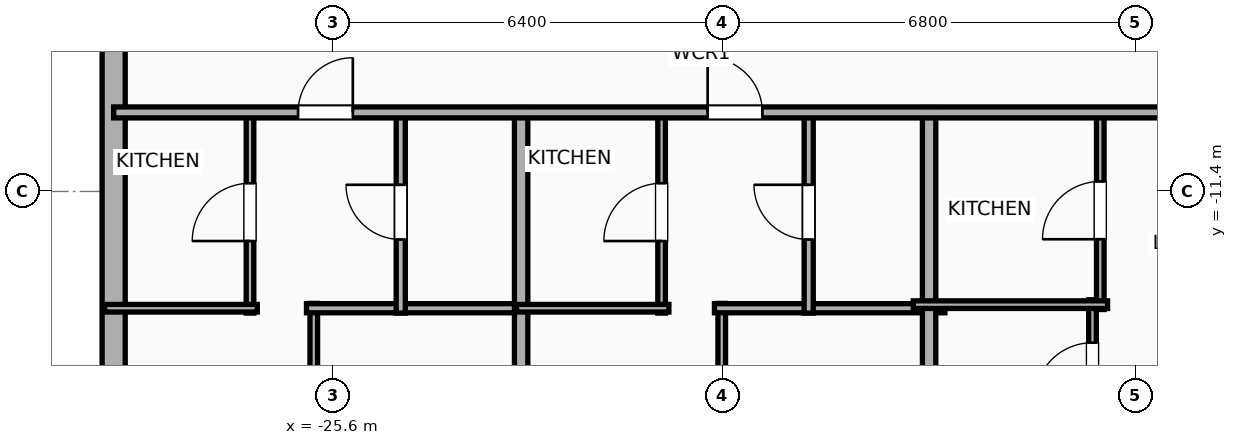
"""IFC4 building model, lengths in metres.
Left out: names, types, materials, properties, quantities, classifications, styles, units other than length and angle.
Written with IfcOpenShell. Run it as: python <this file> out.ifc"""

import sys

from ifc_helpers import new_model, si_unit, direction, frame, frame_2d, origin, place, context, subcontext, project, spatial, rectangle, extrude, element, fill, save


model = new_model("IFC4")
c1 = context("Model", 3, precision=1e-05, world=origin(), true_north=direction((0.0, 1.0)))
c2 = subcontext(c1, "Body", "Model", "MODEL_VIEW")
j1 = project(units=[si_unit("LENGTHUNIT", "METRE"), si_unit("PLANEANGLEUNIT", "RADIAN")], contexts=[c1])
p1 = place(None, origin())
s1 = spatial("IfcSite", under=j1, at=p1, CompositionType="ELEMENT")
p2 = place(p1, origin())
s2 = spatial("IfcBuilding", under=s1, at=p2, CompositionType="ELEMENT")
p3 = place(p2, frame((0.0, 0.0, 101.4)))
s3 = spatial("IfcBuildingStorey", under=s2, at=p3, CompositionType="ELEMENT", Elevation=101.4)
p4 = place(p3, frame((-29.21, -16.581, 0.0), z_axis=(0.0, 0.0, 1.0), x_axis=(0.0, 1.0, 0.0)))
e1 = element("IfcWall", 1, at=p4, inside=s3, PredefinedType="ELEMENTEDWALL", context=c2, shape_type="SweptSolid", body=[
    extrude(rectangle(XDim=34.363, YDim=0.38, at=frame_2d((17.181, 0.0))), origin(), (0.0, 0.0, 1.0), 3.65),
])
p5 = place(p4, frame((31.087, 0.0, 0.75)))
e2 = element("IfcOpeningElement", 2, at=p5, cuts=e1, PredefinedType="OPENING", context=c2, shape_type="SweptSolid", body=[
    extrude(rectangle(XDim=1.2, YDim=2.05, at=frame_2d((0.6, 1.025))), frame((0.0, 0.2, 0.0), z_axis=(0.0, -1.0, 0.0), x_axis=(1.0, 0.0, 0.0)), (0.0, 0.0, 1.0), 0.4),
])
p6 = place(p4, frame((21.626, 0.0, 0.75)))
e3 = element("IfcOpeningElement", 3, at=p6, cuts=e1, PredefinedType="OPENING", context=c2, shape_type="SweptSolid", body=[
    extrude(rectangle(XDim=1.2, YDim=2.05, at=frame_2d((0.6, 1.025))), frame((0.0, 0.2, 0.0), z_axis=(0.0, -1.0, 0.0), x_axis=(1.0, 0.0, 0.0)), (0.0, 0.0, 1.0), 0.4),
])
p7 = place(p4, frame((10.551, 0.0, 0.75)))
e4 = element("IfcOpeningElement", 4, at=p7, cuts=e1, PredefinedType="OPENING", context=c2, shape_type="SweptSolid", body=[
    extrude(rectangle(XDim=1.2, YDim=2.05, at=frame_2d((0.6, 1.025))), frame((0.0, 0.2, 0.0), z_axis=(0.0, -1.0, 0.0), x_axis=(1.0, 0.0, 0.0)), (0.0, 0.0, 1.0), 0.4),
])
p8 = place(p3, frame((-25.919, -20.456, 0.0), z_axis=(0.0, 0.0, 1.0), x_axis=(0.0, 1.0, 0.0)))
e5 = element("IfcWall", 5, at=p8, inside=s3, PredefinedType="PARTITIONING", context=c2, shape_type="SweptSolid", body=[
    extrude(rectangle(XDim=7.216, YDim=0.125, at=frame_2d((3.608, 0.0))), origin(), (0.0, 0.0, 1.0), 3.65),
])
p9 = place(p8, frame((5.034, 0.0, 0.0)))
e6 = element("IfcOpeningElement", 6, at=p9, cuts=e5, PredefinedType="OPENING", context=c2, shape_type="SweptSolid", body=[
    extrude(rectangle(XDim=0.9, YDim=2.05, at=frame_2d((0.45, 1.025))), frame((0.0, 0.073, 0.0), z_axis=(0.0, -1.0, 0.0), x_axis=(1.0, 0.0, 0.0)), (0.0, 0.0, 1.0), 0.145),
])
p10 = place(p3, frame((-26.039, -13.32, 0.0), z_axis=(0.0, 0.0, 1.0), x_axis=(1.0, 0.0, 0.0)))
e7 = element("IfcWall", 7, at=p10, inside=s3, PredefinedType="PLUMBINGWALL", context=c2, shape_type="SweptSolid", body=[
    extrude(rectangle(XDim=3.605, YDim=0.15, at=frame_2d((1.802, 0.0))), origin(), (0.0, 0.0, 1.0), 3.65),
])
p11 = place(p3, frame((-26.968, -13.4, 0.0), z_axis=(0.0, 0.0, 1.0), x_axis=(0.0, 1.0, 0.0)))
e8 = element("IfcWall", 8, at=p11, inside=s3, PredefinedType="PARTITIONING", context=c2, shape_type="SweptSolid", body=[
    extrude(rectangle(XDim=3.32, YDim=0.125, at=frame_2d((1.66, 0.0))), origin(), (0.0, 0.0, 1.0), 3.65),
])
p12 = place(p11, frame((1.185, 0.0, 0.0)))
e9 = element("IfcOpeningElement", 9, at=p12, cuts=e8, PredefinedType="OPENING", context=c2, shape_type="SweptSolid", body=[
    extrude(rectangle(XDim=0.95, YDim=2.05, at=frame_2d((0.475, 1.025))), frame((0.0, 0.073, 0.0), z_axis=(0.0, -1.0, 0.0), x_axis=(1.0, 0.0, 0.0)), (0.0, 0.0, 1.0), 0.145),
])
p13 = place(p3, frame((-29.36, -13.32, 0.0), z_axis=(0.0, 0.0, 1.0), x_axis=(1.0, 0.0, 0.0)))
e10 = element("IfcWall", 10, at=p13, inside=s3, PredefinedType="PARTITIONING", context=c2, shape_type="SweptSolid", body=[
    extrude(rectangle(XDim=2.512, YDim=0.125, at=frame_2d((1.256, 0.0))), origin(), (0.0, 0.0, 1.0), 3.65),
])
p14 = place(p3, frame((-24.489, -13.4, 0.0), z_axis=(0.0, 0.0, 1.0), x_axis=(0.0, 1.0, 0.0)))
e11 = element("IfcWall", 11, at=p14, inside=s3, PredefinedType="PLUMBINGWALL", context=c2, shape_type="SweptSolid", body=[
    extrude(rectangle(XDim=3.32, YDim=0.15, at=frame_2d((1.66, 0.0))), origin(), (0.0, 0.0, 1.0), 3.65),
])
p15 = place(p14, frame((1.21, 0.0, 0.0)))
e12 = element("IfcOpeningElement", 12, at=p15, cuts=e11, PredefinedType="OPENING", context=c2, shape_type="SweptSolid", body=[
    extrude(rectangle(XDim=0.9, YDim=2.05, at=frame_2d((0.45, 1.025))), frame((0.0, 0.085, 0.0), z_axis=(0.0, -1.0, 0.0), x_axis=(1.0, 0.0, 0.0)), (0.0, 0.0, 1.0), 0.17),
])
p16 = place(p3, frame((-22.509, -20.41, 0.0), z_axis=(0.0, 0.0, 1.0), x_axis=(0.0, 1.0, 0.0)))
e13 = element("IfcWall", 13, at=p16, inside=s3, PredefinedType="PARTITIONING", context=c2, shape_type="SweptSolid", body=[
    extrude(rectangle(XDim=10.39, YDim=0.22, at=frame_2d((5.195, 0.0))), origin(), (0.0, 0.0, 1.0), 3.65),
])
p17 = place(p3, frame((-19.21, -20.56, 0.0), z_axis=(0.0, 0.0, 1.0), x_axis=(0.0, 1.0, 0.0)))
e14 = element("IfcWall", 14, at=p17, inside=s3, PredefinedType="PARTITIONING", context=c2, shape_type="SweptSolid", body=[
    extrude(rectangle(XDim=7.32, YDim=0.125, at=frame_2d((3.66, 0.0))), origin(), (0.0, 0.0, 1.0), 3.65),
])
p18 = place(p17, frame((5.113, 0.0, 0.0)))
e15 = element("IfcOpeningElement", 15, at=p18, cuts=e14, PredefinedType="OPENING", context=c2, shape_type="SweptSolid", body=[
    extrude(rectangle(XDim=0.9, YDim=2.05, at=frame_2d((0.45, 1.025))), frame((0.0, 0.073, 0.0), z_axis=(0.0, -1.0, 0.0), x_axis=(1.0, 0.0, 0.0)), (0.0, 0.0, 1.0), 0.145),
])
p19 = place(p3, frame((-19.33, -13.32, 0.0), z_axis=(0.0, 0.0, 1.0), x_axis=(1.0, 0.0, 0.0)))
e16 = element("IfcWall", 16, at=p19, inside=s3, PredefinedType="PLUMBINGWALL", context=c2, shape_type="SweptSolid", body=[
    extrude(rectangle(XDim=3.79, YDim=0.15, at=frame_2d((1.895, 0.0))), origin(), (0.0, 0.0, 1.0), 3.65),
])
p20 = place(p3, frame((-20.199, -13.4, 0.0), z_axis=(0.0, 0.0, 1.0), x_axis=(0.0, 1.0, 0.0)))
e17 = element("IfcWall", 17, at=p20, inside=s3, PredefinedType="PARTITIONING", context=c2, shape_type="SweptSolid", body=[
    extrude(rectangle(XDim=3.32, YDim=0.125, at=frame_2d((1.66, 0.0))), origin(), (0.0, 0.0, 1.0), 3.65),
])
p21 = place(p20, frame((1.185, 0.0, 0.0)))
e18 = element("IfcOpeningElement", 18, at=p21, cuts=e17, PredefinedType="OPENING", context=c2, shape_type="SweptSolid", body=[
    extrude(rectangle(XDim=0.95, YDim=2.05, at=frame_2d((0.475, 1.025))), frame((0.0, 0.073, 0.0), z_axis=(0.0, -1.0, 0.0), x_axis=(1.0, 0.0, 0.0)), (0.0, 0.0, 1.0), 0.145),
])
p22 = place(p3, frame((-22.584, -13.32, 0.0), z_axis=(0.0, 0.0, 1.0), x_axis=(1.0, 0.0, 0.0)))
e19 = element("IfcWall", 19, at=p22, inside=s3, PredefinedType="PARTITIONING", context=c2, shape_type="SweptSolid", body=[
    extrude(rectangle(XDim=2.505, YDim=0.125, at=frame_2d((1.252, 0.0))), origin(), (0.0, 0.0, 1.0), 3.65),
])
p23 = place(p3, frame((-17.78, -13.4, 0.0), z_axis=(0.0, 0.0, 1.0), x_axis=(0.0, 1.0, 0.0)))
e20 = element("IfcWall", 20, at=p23, inside=s3, PredefinedType="PLUMBINGWALL", context=c2, shape_type="SweptSolid", body=[
    extrude(rectangle(XDim=3.32, YDim=0.15, at=frame_2d((1.66, 0.0))), origin(), (0.0, 0.0, 1.0), 3.65),
])
p24 = place(p23, frame((1.21, 0.0, 0.0)))
e21 = element("IfcOpeningElement", 21, at=p24, cuts=e20, PredefinedType="OPENING", context=c2, shape_type="SweptSolid", body=[
    extrude(rectangle(XDim=0.9, YDim=2.05, at=frame_2d((0.45, 1.025))), frame((0.0, 0.085, 0.0), z_axis=(0.0, -1.0, 0.0), x_axis=(1.0, 0.0, 0.0)), (0.0, 0.0, 1.0), 0.17),
])
p25 = place(p3, frame((-15.8, -20.41, 0.0), z_axis=(0.0, 0.0, 1.0), x_axis=(0.0, 1.0, 0.0)))
e22 = element("IfcWall", 22, at=p25, inside=s3, PredefinedType="PARTITIONING", context=c2, shape_type="SweptSolid", body=[
    extrude(rectangle(XDim=10.39, YDim=0.22, at=frame_2d((5.195, 0.0))), origin(), (0.0, 0.0, 1.0), 3.65),
])
p26 = place(p3, frame((-13.113, -20.56, 0.0), z_axis=(0.0, 0.0, 1.0), x_axis=(0.0, 1.0, 0.0)))
e23 = element("IfcWall", 23, at=p26, inside=s3, PredefinedType="PARTITIONING", context=c2, shape_type="SweptSolid", body=[
    extrude(rectangle(XDim=7.379, YDim=0.125, at=frame_2d((3.689, 0.0))), origin(), (0.0, 0.0, 1.0), 3.65),
])
p27 = place(p26, frame((5.723, 0.0, 0.0)))
e24 = element("IfcOpeningElement", 24, at=p27, cuts=e23, PredefinedType="OPENING", context=c2, shape_type="SweptSolid", body=[
    extrude(rectangle(XDim=0.95, YDim=2.05, at=frame_2d((0.475, 1.025))), frame((0.0, 0.073, 0.0), z_axis=(0.0, -1.0, 0.0), x_axis=(1.0, 0.0, 0.0)), (0.0, 0.0, 1.0), 0.145),
])
p28 = place(p3, frame((-12.985, -13.341, 0.0), z_axis=(0.0, 0.0, 1.0), x_axis=(0.0, 1.0, 0.0)))
e25 = element("IfcWall", 25, at=p28, inside=s3, PredefinedType="PARTITIONING", context=c2, shape_type="SweptSolid", body=[
    extrude(rectangle(XDim=3.261, YDim=0.125, at=frame_2d((1.63, 0.0))), origin(), (0.0, 0.0, 1.0), 3.65),
])
p29 = place(p28, frame((1.156, 0.0, 0.0)))
e26 = element("IfcOpeningElement", 26, at=p29, cuts=e25, PredefinedType="OPENING", context=c2, shape_type="SweptSolid", body=[
    extrude(rectangle(XDim=0.95, YDim=2.05, at=frame_2d((0.475, 1.025))), frame((0.0, 0.073, 0.0), z_axis=(0.0, -1.0, 0.0), x_axis=(1.0, 0.0, 0.0)), (0.0, 0.0, 1.0), 0.145),
])
p30 = place(p3, frame((-16.06, -13.261, 0.0), z_axis=(0.0, 0.0, 1.0), x_axis=(1.0, 0.0, 0.0)))
e27 = element("IfcWall", 27, at=p30, inside=s3, PredefinedType="PARTITIONING", context=c2, shape_type="SweptSolid", body=[
    extrude(rectangle(XDim=3.195, YDim=0.125, at=frame_2d((1.598, 0.0))), origin(), (0.0, 0.0, 1.0), 3.65),
])
p31 = place(p3, frame((-29.21, -10.1, 0.0), z_axis=(0.0, 0.0, 1.0), x_axis=(1.0, 0.0, 0.0)))
e28 = element("IfcWall", 28, at=p31, inside=s3, PredefinedType="PARTITIONING", context=c2, shape_type="SweptSolid", body=[
    extrude(rectangle(XDim=62.42, YDim=0.18, at=frame_2d((31.21, 0.0))), origin(), (0.0, 0.0, 1.0), 3.65),
])
p32 = place(p31, frame((3.033, 0.0, 0.0)))
e29 = element("IfcOpeningElement", 29, at=p32, cuts=e28, PredefinedType="OPENING", context=c2, shape_type="SweptSolid", body=[
    extrude(rectangle(XDim=0.9, YDim=2.05, at=frame_2d((0.45, 1.025))), frame((0.0, 0.1, 0.0), z_axis=(0.0, -1.0, 0.0), x_axis=(1.0, 0.0, 0.0)), (0.0, 0.0, 1.0), 0.2),
])
p33 = place(p31, frame((9.768, 0.0, 0.0)))
e30 = element("IfcOpeningElement", 30, at=p33, cuts=e28, PredefinedType="OPENING", context=c2, shape_type="SweptSolid", body=[
    extrude(rectangle(XDim=0.9, YDim=2.05, at=frame_2d((0.45, 1.025))), frame((0.0, 0.1, 0.0), z_axis=(0.0, -1.0, 0.0), x_axis=(1.0, 0.0, 0.0)), (0.0, 0.0, 1.0), 0.2),
])
p34 = place(p31, frame((18.65, 0.0, 0.0)))
e31 = element("IfcOpeningElement", 31, at=p34, cuts=e28, PredefinedType="OPENING", context=c2, shape_type="SweptSolid", body=[
    extrude(rectangle(XDim=1.15, YDim=2.05, at=frame_2d((0.575, 1.025))), frame((0.0, 0.1, 0.0), z_axis=(0.0, -1.0, 0.0), x_axis=(1.0, 0.0, 0.0)), (0.0, 0.0, 1.0), 0.2),
])
p35 = place(p31, frame((29.212, 0.0, 0.0)))
e32 = element("IfcOpeningElement", 32, at=p35, cuts=e28, PredefinedType="OPENING", context=c2, shape_type="SweptSolid", body=[
    extrude(rectangle(XDim=1.15, YDim=2.05, at=frame_2d((0.575, 1.025))), frame((0.0, 0.1, 0.0), z_axis=(0.0, -1.0, 0.0), x_axis=(1.0, 0.0, 0.0)), (0.0, 0.0, 1.0), 0.2),
])
p36 = place(p31, frame((40.379, 0.0, 0.0)))
e33 = element("IfcOpeningElement", 33, at=p36, cuts=e28, PredefinedType="OPENING", context=c2, shape_type="SweptSolid", body=[
    extrude(rectangle(XDim=1.15, YDim=2.05, at=frame_2d((0.575, 1.025))), frame((0.0, 0.1, 0.0), z_axis=(0.0, -1.0, 0.0), x_axis=(1.0, 0.0, 0.0)), (0.0, 0.0, 1.0), 0.2),
])
p37 = place(p31, frame((50.959, 0.0, 0.0)))
e34 = element("IfcOpeningElement", 34, at=p37, cuts=e28, PredefinedType="OPENING", context=c2, shape_type="SweptSolid", body=[
    extrude(rectangle(XDim=1.15, YDim=2.05, at=frame_2d((0.575, 1.025))), frame((0.0, 0.1, 0.0), z_axis=(0.0, -1.0, 0.0), x_axis=(1.0, 0.0, 0.0)), (0.0, 0.0, 1.0), 0.2),
])
p38 = place(p31, frame((59.117, 0.0, 0.0)))
e35 = element("IfcOpeningElement", 35, at=p38, cuts=e28, PredefinedType="OPENING", context=c2, shape_type="SweptSolid", body=[
    extrude(rectangle(XDim=0.9, YDim=2.05, at=frame_2d((0.45, 1.025))), frame((0.0, 0.1, 0.0), z_axis=(0.0, -1.0, 0.0), x_axis=(1.0, 0.0, 0.0)), (0.0, 0.0, 1.0), 0.2),
])
p39 = place(p12, origin())
e36 = element("IfcDoor", 36, at=p39, inside=s3, OperationType="SINGLE_SWING_LEFT", PredefinedType="DOOR", context=c2, shape_type="SweptSolid", body=[
    extrude(rectangle(XDim=0.95, YDim=2.05, at=frame_2d((0.475, 1.025))), frame((0.0, 0.025, 0.0), z_axis=(0.0, -1.0, 0.0), x_axis=(1.0, 0.0, 0.0)), (0.0, 0.0, 1.0), 0.05),
])
fill(e9, e36)
p40 = place(p15, origin())
e37 = element("IfcDoor", 37, at=p40, inside=s3, OperationType="SINGLE_SWING_RIGHT", PredefinedType="DOOR", context=c2, shape_type="SweptSolid", body=[
    extrude(rectangle(XDim=0.9, YDim=2.05, at=frame_2d((0.45, 1.025))), frame((0.0, 0.025, 0.0), z_axis=(0.0, -1.0, 0.0), x_axis=(1.0, 0.0, 0.0)), (0.0, 0.0, 1.0), 0.05),
])
fill(e12, e37)
p41 = place(p21, origin())
e38 = element("IfcDoor", 38, at=p41, inside=s3, OperationType="SINGLE_SWING_LEFT", PredefinedType="DOOR", context=c2, shape_type="SweptSolid", body=[
    extrude(rectangle(XDim=0.95, YDim=2.05, at=frame_2d((0.475, 1.025))), frame((0.0, 0.025, 0.0), z_axis=(0.0, -1.0, 0.0), x_axis=(1.0, 0.0, 0.0)), (0.0, 0.0, 1.0), 0.05),
])
fill(e18, e38)
p42 = place(p24, origin())
e39 = element("IfcDoor", 39, at=p42, inside=s3, OperationType="SINGLE_SWING_RIGHT", PredefinedType="DOOR", context=c2, shape_type="SweptSolid", body=[
    extrude(rectangle(XDim=0.9, YDim=2.05, at=frame_2d((0.45, 1.025))), frame((0.0, 0.025, 0.0), z_axis=(0.0, -1.0, 0.0), x_axis=(1.0, 0.0, 0.0)), (0.0, 0.0, 1.0), 0.05),
])
fill(e21, e39)
p43 = place(p27, origin())
e40 = element("IfcDoor", 40, at=p43, inside=s3, OperationType="SINGLE_SWING_LEFT", PredefinedType="DOOR", context=c2, shape_type="SweptSolid", body=[
    extrude(rectangle(XDim=0.95, YDim=2.05, at=frame_2d((0.475, 1.025))), frame((0.0, 0.025, 0.0), z_axis=(0.0, -1.0, 0.0), x_axis=(1.0, 0.0, 0.0)), (0.0, 0.0, 1.0), 0.05),
])
fill(e24, e40)
p44 = place(p29, origin())
e41 = element("IfcDoor", 41, at=p44, inside=s3, OperationType="SINGLE_SWING_LEFT", PredefinedType="DOOR", context=c2, shape_type="SweptSolid", body=[
    extrude(rectangle(XDim=0.95, YDim=2.05, at=frame_2d((0.475, 1.025))), frame((0.0, 0.025, 0.0), z_axis=(0.0, -1.0, 0.0), x_axis=(1.0, 0.0, 0.0)), (0.0, 0.0, 1.0), 0.05),
])
fill(e26, e41)
p45 = place(p32, origin())
e42 = element("IfcDoor", 42, at=p45, inside=s3, OperationType="SINGLE_SWING_RIGHT", PredefinedType="DOOR", context=c2, shape_type="SweptSolid", body=[
    extrude(rectangle(XDim=0.9, YDim=2.05, at=frame_2d((0.45, 1.025))), frame((0.0, 0.025, 0.0), z_axis=(0.0, -1.0, 0.0), x_axis=(1.0, 0.0, 0.0)), (0.0, 0.0, 1.0), 0.05),
])
fill(e29, e42)
p46 = place(p33, origin())
e43 = element("IfcDoor", 43, at=p46, inside=s3, OperationType="SINGLE_SWING_LEFT", PredefinedType="DOOR", context=c2, shape_type="SweptSolid", body=[
    extrude(rectangle(XDim=0.9, YDim=2.05, at=frame_2d((0.45, 1.025))), frame((0.0, 0.025, 0.0), z_axis=(0.0, -1.0, 0.0), x_axis=(1.0, 0.0, 0.0)), (0.0, 0.0, 1.0), 0.05),
])
fill(e30, e43)
save(model, sys.argv[1])
